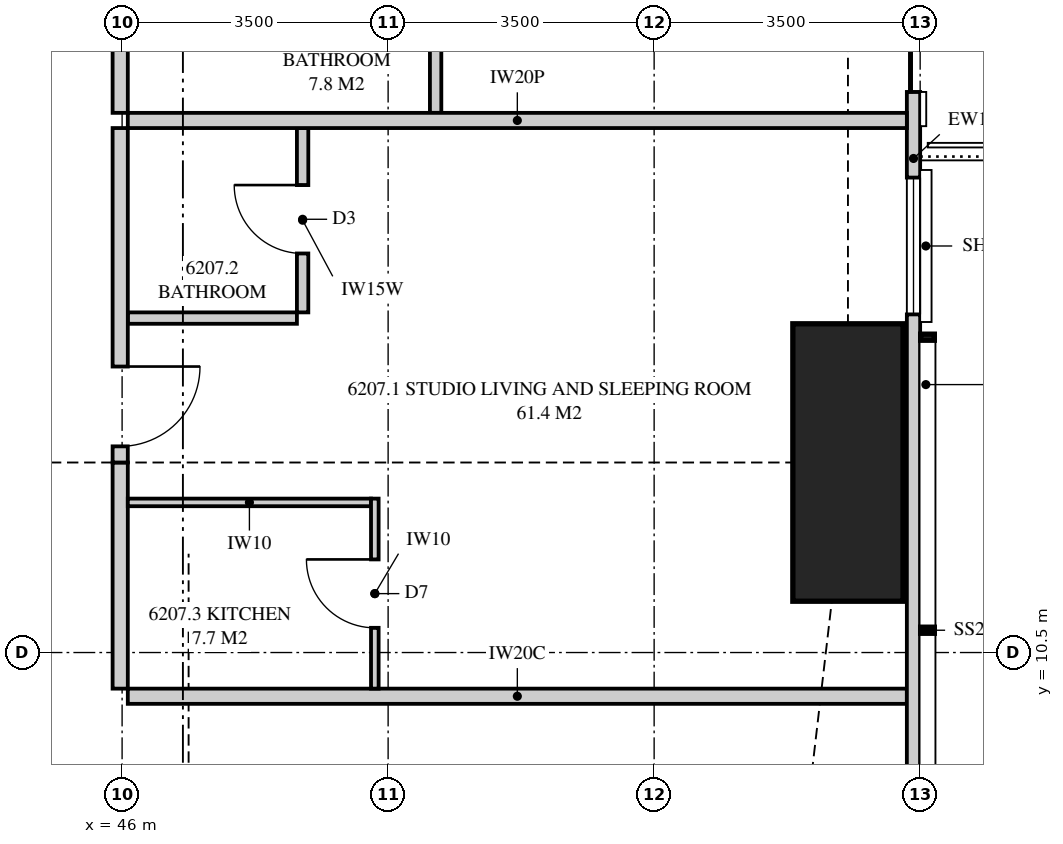
"""IFC4 building model, lengths in metres.
Left out: names, types, materials, properties, quantities, classifications, styles, units other than length and angle.
Written with IfcOpenShell. Run it as: python <this file> out.ifc"""

import sys

from ifc_helpers import new_model, si_unit, direction, frame, frame_2d, origin, origin_2d, place, context, subcontext, project, spatial, polyline, rectangle, outline, extrude, element, fill, save


model = new_model("IFC4")
c1 = context("Model", 3, precision=1e-05, world=origin(), true_north=direction((0.0, 1.0)))
c2 = subcontext(c1, "Body", "Model", "MODEL_VIEW")
j1 = project(units=[si_unit("LENGTHUNIT", "METRE"), si_unit("PLANEANGLEUNIT", "RADIAN")], contexts=[c1])
p1 = place(None, origin())
s1 = spatial("IfcSite", under=j1, at=p1, CompositionType="ELEMENT")
p2 = place(p1, origin())
s2 = spatial("IfcBuilding", under=s1, at=p2, CompositionType="ELEMENT")
p3 = place(p2, frame((0.0, 0.0, 228.45)))
s3 = spatial("IfcBuildingStorey", under=s2, at=p3, CompositionType="ELEMENT", Elevation=228.45)
p4 = place(p3, frame((55.55, 13.0, 0.0), z_axis=(0.0, 0.0, 1.0), x_axis=(1.0, 0.0, 0.0)))
e1 = element("IfcColumn", 1, at=p4, inside=s3, PredefinedType="COLUMN", context=c2, shape_type="SweptSolid", body=[
    extrude(rectangle(XDim=1.45, YDim=3.65, at=origin_2d()), origin(), (0.0, 0.0, 1.0), 3.5),
])
p5 = place(p3, frame((56.413, 3.051, 0.0), z_axis=(0.0, 0.0, 1.0), x_axis=(0.0, 1.0, 0.0)))
e2 = element("IfcWall", 2, at=p5, inside=s3, PredefinedType="SOLIDWALL", context=c2, shape_type="SweptSolid", body=[
    extrude(outline(polyline([(0.0, 0.0), (27.897, 0.0), (27.897, 3.26), (22.157, 3.26), (22.157, 2.3), (22.092, 2.3), (22.092, 3.26), (21.949, 3.26), (21.949, 2.3), (9.949, 2.3), (9.949, 3.26), (9.858, 3.26), (9.858, 2.3), (9.688, 2.3), (9.688, 3.26), (0.0, 3.26), (0.0, 0.0)])), frame((0.0, 0.087, 0.0), z_axis=(0.0, -1.0, 0.0), x_axis=(1.0, 0.0, 0.0)), (0.0, 0.0, 1.0), 0.175),
])
p6 = place(p5, frame((1.187, 0.0, 0.4)))
e3 = element("IfcOpeningElement", 3, at=p6, cuts=e2, PredefinedType="OPENING", context=c2, shape_type="SweptSolid", body=[
    extrude(rectangle(XDim=2.4, YDim=1.85, at=frame_2d((1.2, 0.925))), frame((0.0, 0.097, 0.0), z_axis=(0.0, -1.0, 0.0), x_axis=(1.0, 0.0, 0.0)), (0.0, 0.0, 1.0), 0.195),
])
p7 = place(p5, frame((11.897, 0.0, 0.4)))
e4 = element("IfcOpeningElement", 4, at=p7, cuts=e2, PredefinedType="OPENING", context=c2, shape_type="SweptSolid", body=[
    extrude(rectangle(XDim=1.8, YDim=1.85, at=frame_2d((0.9, 0.925))), frame((0.0, 0.097, 0.0), z_axis=(0.0, -1.0, 0.0), x_axis=(1.0, 0.0, 0.0)), (0.0, 0.0, 1.0), 0.195),
])
p8 = place(p5, frame((14.824, 0.0, 0.0)))
e5 = element("IfcOpeningElement", 5, at=p8, cuts=e2, PredefinedType="OPENING", context=c2, shape_type="SweptSolid", body=[
    extrude(rectangle(XDim=1.8, YDim=2.25, at=frame_2d((0.9, 1.125))), frame((0.0, 0.097, 0.0), z_axis=(0.0, -1.0, 0.0), x_axis=(1.0, 0.0, 0.0)), (0.0, 0.0, 1.0), 0.195),
])
p9 = place(p5, frame((18.224, 0.0, 0.4)))
e6 = element("IfcOpeningElement", 6, at=p9, cuts=e2, PredefinedType="OPENING", context=c2, shape_type="SweptSolid", body=[
    extrude(rectangle(XDim=1.8, YDim=1.85, at=frame_2d((0.9, 0.925))), frame((0.0, 0.097, 0.0), z_axis=(0.0, -1.0, 0.0), x_axis=(1.0, 0.0, 0.0)), (0.0, 0.0, 1.0), 0.195),
])
p10 = place(p3, frame((46.075, 9.925, 0.0), z_axis=(0.0, 0.0, 1.0), x_axis=(1.0, 0.0, 0.0)))
e7 = element("IfcWall", 7, at=p10, inside=s3, PredefinedType="PARTITIONING", context=c2, shape_type="SweptSolid", body=[
    extrude(outline(polyline([(0.0, 0.0), (10.25, 0.0), (10.25, 3.26), (10.033, 3.26), (10.033, 2.3), (8.201, 2.3), (8.201, 3.26), (2.11, 3.26), (2.11, 2.66), (0.0, 2.66), (0.0, 3.26), (0.0, 0.0)])), frame((0.0, 0.1, 0.0), z_axis=(0.0, -1.0, 0.0), x_axis=(1.0, 0.0, 0.0)), (0.0, 0.0, 1.0), 0.2),
])
p11 = place(p3, frame((56.325, 17.5, 0.0), z_axis=(0.0, 0.0, 1.0), x_axis=(-1.0, 0.0, 0.0)))
e8 = element("IfcWall", 8, at=p11, inside=s3, PredefinedType="PARTITIONING", context=c2, shape_type="SweptSolid", body=[
    extrude(outline(polyline([(0.0, 0.0), (10.25, 0.0), (10.25, 3.26), (10.25, 2.66), (1.685, 2.66), (1.685, 2.3), (0.0, 2.3), (0.0, 3.26), (0.0, 0.0)])), frame((0.0, 0.1, 0.0), z_axis=(0.0, -1.0, 0.0), x_axis=(1.0, 0.0, 0.0)), (0.0, 0.0, 1.0), 0.2),
])
p12 = place(p3, frame((45.975, 10.025, 0.0), z_axis=(0.0, 0.0, 1.0), x_axis=(0.0, 1.0, 0.0)))
e9 = element("IfcWall", 9, at=p12, inside=s3, PredefinedType="PARTITIONING", context=c2, shape_type="SweptSolid", body=[
    extrude(rectangle(XDim=2.975, YDim=0.2, at=frame_2d((1.488, 0.0))), origin(), (0.0, 0.0, 1.0), 2.66),
])
p13 = place(p3, frame((45.975, 13.0, 0.0), z_axis=(0.0, 0.0, 1.0), x_axis=(0.0, 1.0, 0.0)))
e10 = element("IfcWall", 10, at=p13, inside=s3, PredefinedType="PARTITIONING", context=c2, shape_type="SweptSolid", body=[
    extrude(outline(polyline([(0.0, 0.0), (4.4, 0.0), (4.4, 3.26), (1.31, 3.26), (1.31, 2.66), (0.0, 2.66), (0.0, 0.0)])), frame((0.0, 0.1, 0.0), z_axis=(0.0, -1.0, 0.0), x_axis=(1.0, 0.0, 0.0)), (0.0, 0.0, 1.0), 0.2),
])
p14 = place(p13, frame((0.212, 0.0, 0.0)))
e11 = element("IfcOpeningElement", 11, at=p14, cuts=e10, PredefinedType="OPENING", context=c2, shape_type="SweptSolid", body=[
    extrude(rectangle(XDim=1.05, YDim=2.2, at=frame_2d((0.525, 1.1))), frame((0.0, 0.11, 0.0), z_axis=(0.0, -1.0, 0.0), x_axis=(1.0, 0.0, 0.0)), (0.0, 0.0, 1.0), 0.22),
])
p15 = place(p3, frame((48.375, 14.975, 0.0), z_axis=(0.0, 0.0, 1.0), x_axis=(0.0, 1.0, 0.0)))
e12 = element("IfcWall", 12, at=p15, inside=s3, PredefinedType="PLUMBINGWALL", context=c2, shape_type="SweptSolid", body=[
    extrude(rectangle(XDim=2.425, YDim=0.15, at=frame_2d((1.212, 0.0))), origin(), (0.0, 0.0, 1.0), 3.26),
])
p16 = place(p15, frame((0.775, 0.0, 0.0)))
e13 = element("IfcOpeningElement", 13, at=p16, cuts=e12, PredefinedType="OPENING", context=c2, shape_type="SweptSolid", body=[
    extrude(rectangle(XDim=0.9, YDim=2.1, at=frame_2d((0.45, 1.05))), frame((0.0, 0.085, 0.0), z_axis=(0.0, -1.0, 0.0), x_axis=(1.0, 0.0, 0.0)), (0.0, 0.0, 1.0), 0.17),
])
p17 = place(p3, frame((48.3, 14.9, 0.0), z_axis=(0.0, 0.0, 1.0), x_axis=(-1.0, 0.0, 0.0)))
e14 = element("IfcWall", 14, at=p17, inside=s3, PredefinedType="PLUMBINGWALL", context=c2, shape_type="SweptSolid", body=[
    extrude(rectangle(XDim=2.225, YDim=0.15, at=frame_2d((1.113, 0.0))), origin(), (0.0, 0.0, 1.0), 3.26),
])
p18 = place(p3, frame((45.975, 17.6, 0.0), z_axis=(0.0, 0.0, 1.0), x_axis=(0.0, 1.0, 0.0)))
e15 = element("IfcWall", 15, at=p18, inside=s3, PredefinedType="PARTITIONING", context=c2, shape_type="SweptSolid", body=[
    extrude(outline(polyline([(0.0, 0.0), (7.4, 0.0), (7.4, 2.66), (6.09, 2.66), (6.09, 3.26), (2.46, 3.26), (2.46, 2.66), (0.0, 2.66), (0.0, 0.0)])), frame((0.0, 0.1, 0.0), z_axis=(0.0, -1.0, 0.0), x_axis=(1.0, 0.0, 0.0)), (0.0, 0.0, 1.0), 0.2),
])
p19 = place(p18, frame((4.188, 0.0, 0.0)))
e16 = element("IfcOpeningElement", 16, at=p19, cuts=e15, PredefinedType="OPENING", context=c2, shape_type="SweptSolid", body=[
    extrude(rectangle(XDim=1.05, YDim=2.2, at=frame_2d((0.525, 1.1))), frame((0.0, 0.11, 0.0), z_axis=(0.0, -1.0, 0.0), x_axis=(1.0, 0.0, 0.0)), (0.0, 0.0, 1.0), 0.22),
])
p20 = place(p3, frame((50.125, 17.6, 0.0), z_axis=(0.0, 0.0, 1.0), x_axis=(0.0, 1.0, 0.0)))
e17 = element("IfcWall", 17, at=p20, inside=s3, PredefinedType="PLUMBINGWALL", context=c2, shape_type="SweptSolid", body=[
    extrude(outline(polyline([(0.0, 0.0), (3.15, 0.0), (3.15, 3.26), (2.435, 3.26), (2.435, 2.66), (0.0, 2.66), (0.0, 3.26), (0.0, 0.0)])), frame((0.0, 0.075, 0.0), z_axis=(0.0, -1.0, 0.0), x_axis=(1.0, 0.0, 0.0)), (0.0, 0.0, 1.0), 0.15),
])
p21 = place(p20, frame((1.85, 0.0, 0.0)))
e18 = element("IfcOpeningElement", 18, at=p21, cuts=e17, PredefinedType="OPENING", context=c2, shape_type="SweptSolid", body=[
    extrude(rectangle(XDim=0.9, YDim=2.1, at=frame_2d((0.45, 1.05))), frame((0.0, 0.085, 0.0), z_axis=(0.0, -1.0, 0.0), x_axis=(1.0, 0.0, 0.0)), (0.0, 0.0, 1.0), 0.17),
])
p22 = place(p3, frame((49.325, 10.025, 0.0), z_axis=(0.0, 0.0, 1.0), x_axis=(0.0, 1.0, 0.0)))
e19 = element("IfcWall", 19, at=p22, inside=s3, PredefinedType="PARTITIONING", context=c2, shape_type="SweptSolid", body=[
    extrude(outline(polyline([(0.0, 0.0), (2.5, 0.0), (2.5, 3.26), (2.5, 2.66), (1.715, 2.66), (1.715, 3.26), (0.0, 3.26), (0.0, 0.0)])), frame((0.0, 0.05, 0.0), z_axis=(0.0, -1.0, 0.0), x_axis=(1.0, 0.0, 0.0)), (0.0, 0.0, 1.0), 0.1),
])
p23 = place(p22, frame((0.8, 0.0, 0.0)))
e20 = element("IfcOpeningElement", 20, at=p23, cuts=e19, PredefinedType="OPENING", context=c2, shape_type="SweptSolid", body=[
    extrude(rectangle(XDim=0.9, YDim=2.1, at=frame_2d((0.45, 1.05))), frame((0.0, 0.06, 0.0), z_axis=(0.0, -1.0, 0.0), x_axis=(1.0, 0.0, 0.0)), (0.0, 0.0, 1.0), 0.12),
])
p24 = place(p3, frame((46.075, 12.475, 0.0), z_axis=(0.0, 0.0, 1.0), x_axis=(1.0, 0.0, 0.0)))
e21 = element("IfcWall", 21, at=p24, inside=s3, PredefinedType="PARTITIONING", context=c2, shape_type="SweptSolid", body=[
    extrude(outline(polyline([(0.0, 0.0), (3.2, 0.0), (3.2, 3.26), (3.2, 2.66), (2.06, 2.66), (0.0, 2.66), (0.0, 3.26), (0.0, 0.0)])), frame((0.0, 0.05, 0.0), z_axis=(0.0, -1.0, 0.0), x_axis=(1.0, 0.0, 0.0)), (0.0, 0.0, 1.0), 0.1),
])
p25 = place(p7, origin())
e22 = element("IfcWindow", 22, at=p25, inside=s3, PartitioningType="SINGLE_PANEL", PredefinedType="WINDOW", context=c2, shape_type="SweptSolid", body=[
    extrude(rectangle(XDim=1.8, YDim=1.85, at=frame_2d((0.9, 0.925))), frame((0.0, 0.03, 0.0), z_axis=(0.0, -1.0, 0.0), x_axis=(1.0, 0.0, 0.0)), (0.0, 0.0, 1.0), 0.06),
])
fill(e4, e22)
p26 = place(p8, origin())
e23 = element("IfcDoor", 23, at=p26, inside=s3, OperationType="SLIDING_TO_LEFT", PredefinedType="DOOR", context=c2, shape_type="SweptSolid", body=[
    extrude(rectangle(XDim=1.8, YDim=2.25, at=frame_2d((0.9, 1.125))), frame((0.0, 0.025, 0.0), z_axis=(0.0, -1.0, 0.0), x_axis=(1.0, 0.0, 0.0)), (0.0, 0.0, 1.0), 0.05),
])
fill(e5, e23)
p27 = place(p14, frame((1.05, 0.0, 0.0), z_axis=(0.0, 0.0, 1.0), x_axis=(-1.0, 0.0, 0.0)))
e24 = element("IfcDoor", 24, at=p27, inside=s3, OperationType="SINGLE_SWING_LEFT", PredefinedType="DOOR", context=c2, shape_type="SweptSolid", body=[
    extrude(rectangle(XDim=1.05, YDim=2.2, at=frame_2d((0.525, 1.1))), frame((0.0, 0.025, 0.0), z_axis=(0.0, -1.0, 0.0), x_axis=(1.0, 0.0, 0.0)), (0.0, 0.0, 1.0), 0.05),
])
fill(e11, e24)
p28 = place(p16, origin())
e25 = element("IfcDoor", 25, at=p28, inside=s3, OperationType="SINGLE_SWING_RIGHT", PredefinedType="DOOR", context=c2, shape_type="SweptSolid", body=[
    extrude(rectangle(XDim=0.9, YDim=2.1, at=frame_2d((0.45, 1.05))), frame((0.0, 0.025, 0.0), z_axis=(0.0, -1.0, 0.0), x_axis=(1.0, 0.0, 0.0)), (0.0, 0.0, 1.0), 0.05),
])
fill(e13, e25)
p29 = place(p23, origin())
e26 = element("IfcDoor", 26, at=p29, inside=s3, OperationType="SINGLE_SWING_RIGHT", PredefinedType="DOOR", context=c2, shape_type="SweptSolid", body=[
    extrude(rectangle(XDim=0.9, YDim=2.1, at=frame_2d((0.45, 1.05))), frame((0.0, 0.025, 0.0), z_axis=(0.0, -1.0, 0.0), x_axis=(1.0, 0.0, 0.0)), (0.0, 0.0, 1.0), 0.05),
])
fill(e20, e26)
save(model, sys.argv[1])
